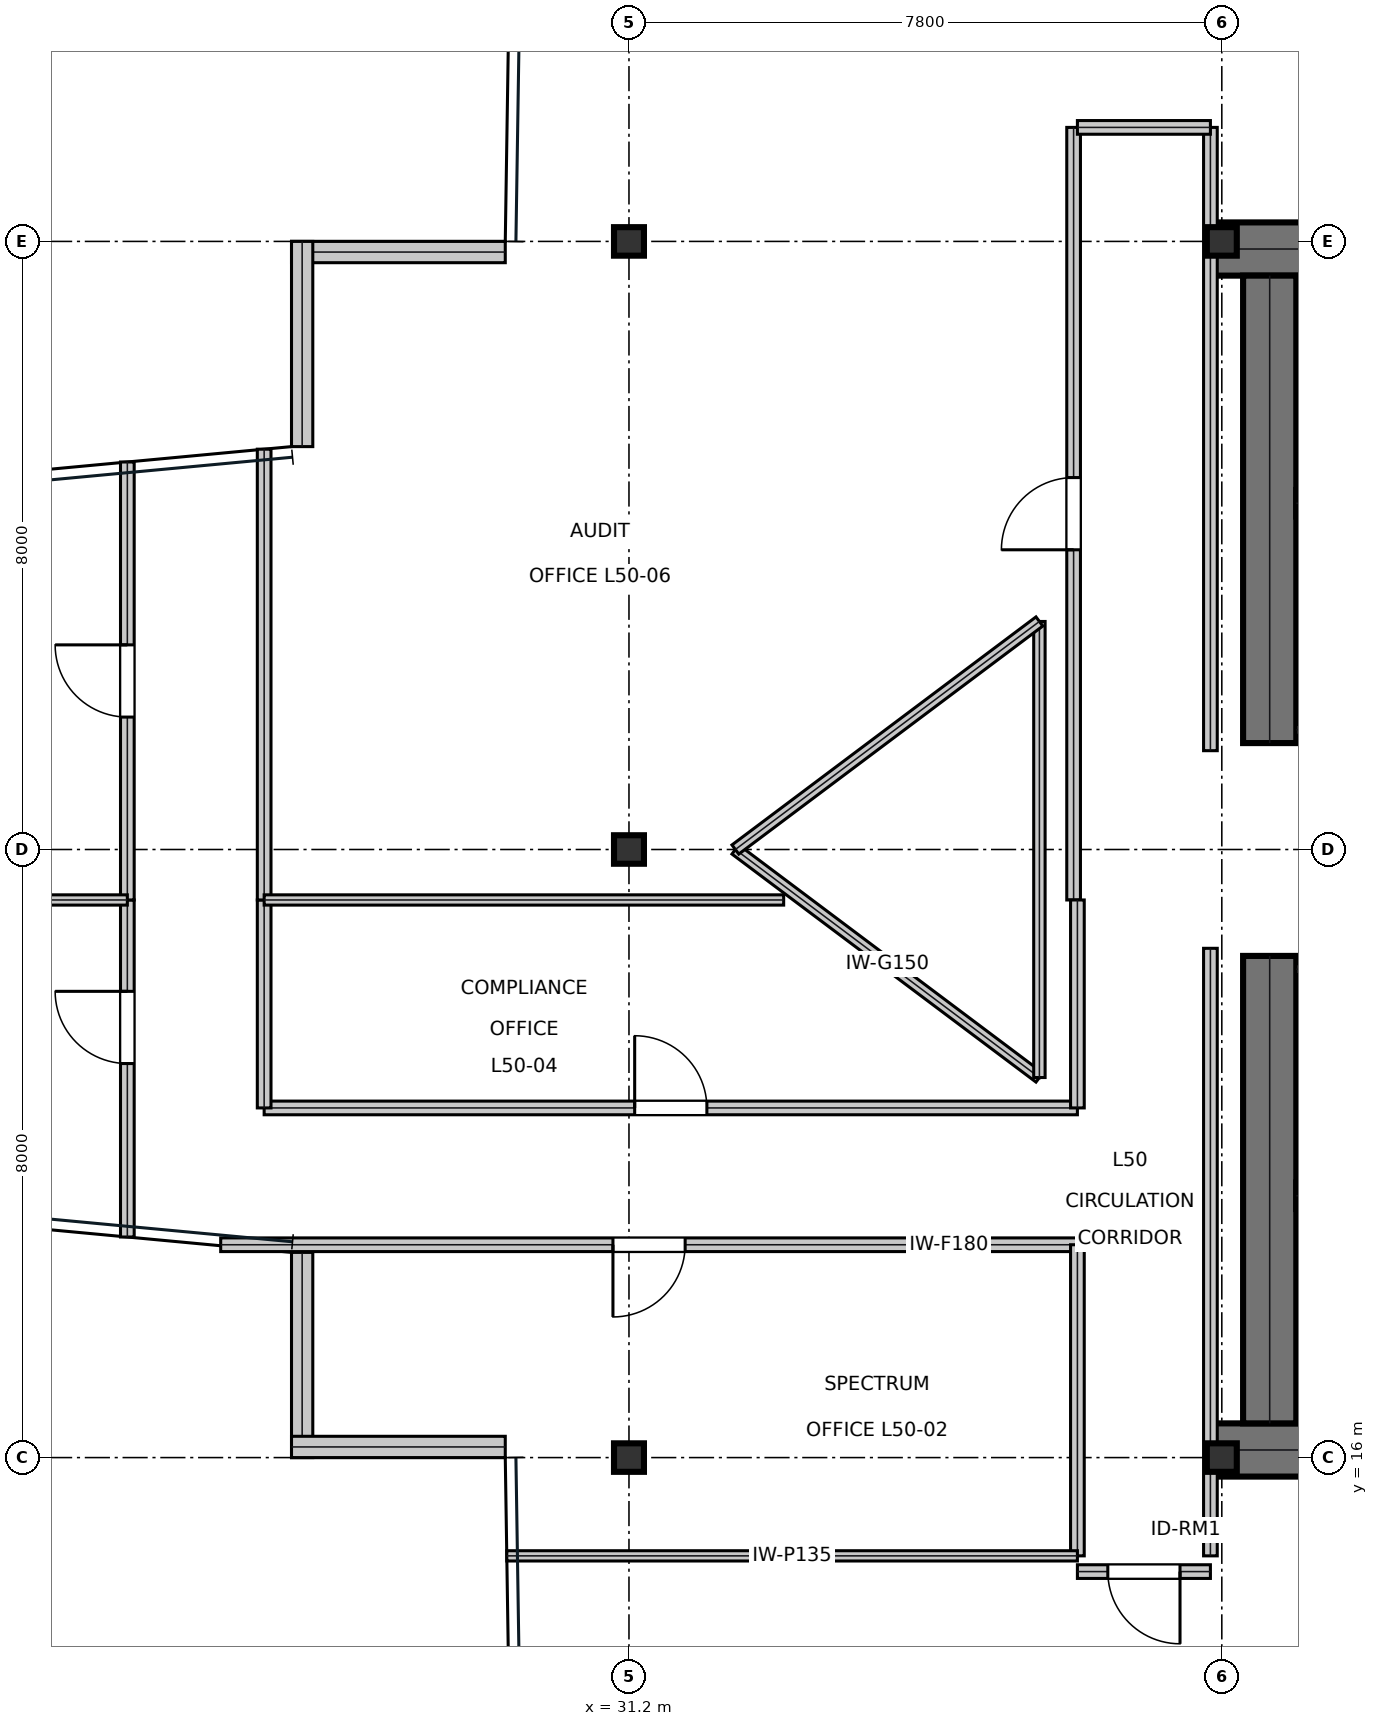
"""IFC4 building model, lengths in metres.
Left out: names, types, materials, properties, quantities, classifications, styles, units other than length and angle.
Written with IfcOpenShell. Run it as: python <this file> out.ifc"""

import sys

from ifc_helpers import new_model, si_unit, direction, frame, frame_2d, origin, origin_2d, place, context, subcontext, project, spatial, rectangle, i_section, extrude, element, fill, save


model = new_model("IFC4")
c1 = context("Model", 3, precision=1e-05, world=origin(), true_north=direction((0.0, 1.0)))
c2 = subcontext(c1, "Body", "Model", "MODEL_VIEW")
j1 = project(units=[si_unit("LENGTHUNIT", "METRE"), si_unit("PLANEANGLEUNIT", "RADIAN")], contexts=[c1])
p1 = place(None, origin())
s1 = spatial("IfcSite", under=j1, at=p1, CompositionType="ELEMENT")
p2 = place(p1, origin())
s2 = spatial("IfcBuilding", under=s1, at=p2, CompositionType="ELEMENT")
p3 = place(p2, frame((0.0, 0.0, 216.15)))
s3 = spatial("IfcBuildingStorey", under=s2, at=p3, CompositionType="ELEMENT", Elevation=216.15)
for number, where, z_axis, x_axis in (
    (1, (38.8, 31.9, 0.0), (0.0, 0.0, 1.0), (1.0, 0.0, 0.0)),
    (2, (38.8, 16.1, 0.0), (0.0, 0.0, 1.0), (1.0, 0.0, 0.0)),
):
    element("IfcWall", number, at=place(p3, frame(where, z_axis=z_axis, x_axis=x_axis)), inside=s3, PredefinedType="SHEAR", context=c2, shape_type="SweptSolid", body=[
        extrude(rectangle(XDim=16.0, YDim=0.7, at=frame_2d((8.0, 0.0))), origin(), (0.0, 0.0, 1.0), 3.79),
    ])
for number, where, z_axis, x_axis in (
    (3, (39.63, 16.45, 0.0), (0.0, 0.0, 1.0), (0.0, 1.0, 0.0)),
    (4, (39.63, 25.4, 0.0), (0.0, 0.0, 1.0), (0.0, 1.0, 0.0)),
):
    element("IfcWall", number, at=place(p3, frame(where, z_axis=z_axis, x_axis=x_axis)), inside=s3, PredefinedType="SHEAR", context=c2, shape_type="SweptSolid", body=[
        extrude(rectangle(XDim=6.15, YDim=0.7, at=frame_2d((3.075, 0.0))), origin(), (0.0, 0.0, 1.0), 3.79),
    ])
p4 = place(p3, frame((39.98, 28.555, 0.0), z_axis=(0.0, 0.0, 1.0), x_axis=(1.0, 0.0, 0.0)))
e5 = element("IfcWall", 5, at=p4, inside=s3, PredefinedType="SHEAR", context=c2, shape_type="SweptSolid", body=[
    extrude(rectangle(XDim=7.71, YDim=0.35, at=frame_2d((3.855, 0.0))), origin(), (0.0, 0.0, 1.0), 3.79),
])
p5 = place(p4, frame((0.25, 0.0, 0.0)))
e6 = element("IfcOpeningElement", 6, at=p5, cuts=e5, PredefinedType="OPENING", context=c2, shape_type="SweptSolid", body=[
    extrude(rectangle(XDim=1.1, YDim=2.15, at=frame_2d((0.55, 1.075))), frame((0.0, 0.185, 0.0), z_axis=(0.0, -1.0, 0.0), x_axis=(1.0, 0.0, 0.0)), (0.0, 0.0, 1.0), 0.37),
])
p6 = place(p3, frame((39.98, 19.445, 0.0), z_axis=(0.0, 0.0, 1.0), x_axis=(1.0, 0.0, 0.0)))
e7 = element("IfcWall", 7, at=p6, inside=s3, PredefinedType="SHEAR", context=c2, shape_type="SweptSolid", body=[
    extrude(rectangle(XDim=7.71, YDim=0.35, at=frame_2d((3.855, 0.0))), origin(), (0.0, 0.0, 1.0), 3.79),
])
p7 = place(p6, frame((0.25, 0.0, 0.0)))
e8 = element("IfcOpeningElement", 8, at=p7, cuts=e7, PredefinedType="OPENING", context=c2, shape_type="SweptSolid", body=[
    extrude(rectangle(XDim=1.1, YDim=2.15, at=frame_2d((0.55, 1.075))), frame((0.0, 0.185, 0.0), z_axis=(0.0, -1.0, 0.0), x_axis=(1.0, 0.0, 0.0)), (0.0, 0.0, 1.0), 0.37),
])
for number, where, z_axis, x_axis in (
    (9, (31.2, 16.0, 0.0), (0.0, 0.0, 1.0), (1.0, 0.0, 0.0)),
    (10, (31.2, 24.0, 0.0), (0.0, 0.0, 1.0), (1.0, 0.0, 0.0)),
    (11, (31.2, 32.0, 0.0), (0.0, 0.0, 1.0), (1.0, 0.0, 0.0)),
    (12, (39.0, 16.0, 0.0), (0.0, 0.0, 1.0), (1.0, 0.0, 0.0)),
    (13, (39.0, 32.0, 0.0), (0.0, 0.0, 1.0), (1.0, 0.0, 0.0)),
):
    element("IfcColumn", number, at=place(p3, frame(where, z_axis=z_axis, x_axis=x_axis)), inside=s3, PredefinedType="COLUMN", context=c2, shape_type="SweptSolid", body=[
        extrude(i_section(OverallWidth=0.394, OverallDepth=0.375, WebThickness=0.017, FlangeThickness=0.028, at=origin_2d()), origin(), (0.0, 0.0, 1.0), 4.044),
    ])
p8 = place(p3, frame((29.573, 31.86, 0.0), z_axis=(0.0, 0.0, 1.0), x_axis=(-1.0, 0.0, 0.0)))
e14 = element("IfcWall", 14, at=p8, inside=s3, PredefinedType="STANDARD", context=c2, shape_type="SweptSolid", body=[
    extrude(rectangle(XDim=2.812, YDim=0.28, at=frame_2d((1.406, 0.0))), origin(), (0.0, 0.0, 1.0), 3.79),
])
for number, where, z_axis, x_axis in (
    (15, (26.9, 32.0, 0.0), (0.0, 0.0, 1.0), (0.0, -1.0, 0.0)),
    (16, (26.9, 18.7, 0.0), (0.0, 0.0, 1.0), (0.0, -1.0, 0.0)),
):
    element("IfcWall", number, at=place(p3, frame(where, z_axis=z_axis, x_axis=x_axis)), inside=s3, PredefinedType="STANDARD", context=c2, shape_type="SweptSolid", body=[
        extrude(rectangle(XDim=2.7, YDim=0.28, at=frame_2d((1.35, 0.0))), origin(), (0.0, 0.0, 1.0), 3.319),
    ])
p9 = place(p3, frame((26.76, 16.14, 0.0), z_axis=(0.0, 0.0, 1.0), x_axis=(1.0, 0.0, 0.0)))
e17 = element("IfcWall", 17, at=p9, inside=s3, PredefinedType="STANDARD", context=c2, shape_type="SweptSolid", body=[
    extrude(rectangle(XDim=2.812, YDim=0.28, at=frame_2d((1.406, 0.0))), origin(), (0.0, 0.0, 1.0), 3.79),
])
p10 = place(p3, frame((39.98, 25.575, 0.0), z_axis=(0.0, 0.0, 1.0), x_axis=(1.0, 0.0, 0.0)))
e18 = element("IfcWall", 18, at=p10, inside=s3, PredefinedType="PARTITIONING", context=c2, shape_type="SweptSolid", body=[
    extrude(rectangle(XDim=5.9, YDim=0.15, at=frame_2d((2.95, 0.0))), origin(), (0.0, 0.0, 1.0), 3.79),
])
p11 = place(p10, frame((2.35, 0.0, 0.0)))
e19 = element("IfcOpeningElement", 19, at=p11, cuts=e18, PredefinedType="OPENING", context=c2, shape_type="SweptSolid", body=[
    extrude(rectangle(XDim=1.05, YDim=2.15, at=frame_2d((0.525, 1.075))), frame((0.0, 0.085, 0.0), z_axis=(0.0, -1.0, 0.0), x_axis=(1.0, 0.0, 0.0)), (0.0, 0.0, 1.0), 0.17),
])
p12 = place(p3, frame((39.98, 22.425, 0.0), z_axis=(0.0, 0.0, 1.0), x_axis=(1.0, 0.0, 0.0)))
e20 = element("IfcWall", 20, at=p12, inside=s3, PredefinedType="PARTITIONING", context=c2, shape_type="SweptSolid", body=[
    extrude(rectangle(XDim=5.9, YDim=0.15, at=frame_2d((2.95, 0.0))), origin(), (0.0, 0.0, 1.0), 3.79),
])
p13 = place(p12, frame((2.35, 0.0, 0.0)))
e21 = element("IfcOpeningElement", 21, at=p13, cuts=e20, PredefinedType="OPENING", context=c2, shape_type="SweptSolid", body=[
    extrude(rectangle(XDim=1.05, YDim=2.15, at=frame_2d((0.525, 1.075))), frame((0.0, 0.085, 0.0), z_axis=(0.0, -1.0, 0.0), x_axis=(1.0, 0.0, 0.0)), (0.0, 0.0, 1.0), 0.17),
])
p14 = place(p3, frame((37.1, 14.5, 0.0), z_axis=(0.0, 0.0, 1.0), x_axis=(1.0, 0.0, 0.0)))
e22 = element("IfcWall", 22, at=p14, inside=s3, PredefinedType="SOLIDWALL", context=c2, shape_type="SweptSolid", body=[
    extrude(rectangle(XDim=1.75, YDim=0.18, at=frame_2d((0.875, 0.0))), origin(), (0.0, 0.0, 1.0), 3.241),
])
p15 = place(p14, frame((0.4, 0.0, 0.0)))
e23 = element("IfcOpeningElement", 23, at=p15, cuts=e22, PredefinedType="OPENING", context=c2, shape_type="SweptSolid", body=[
    extrude(rectangle(XDim=0.95, YDim=2.15, at=frame_2d((0.475, 1.075))), frame((0.0, 0.1, 0.0), z_axis=(0.0, -1.0, 0.0), x_axis=(1.0, 0.0, 0.0)), (0.0, 0.0, 1.0), 0.2),
])
p16 = place(p3, frame((25.828, 18.8, 0.0), z_axis=(0.0, 0.0, 1.0), x_axis=(1.0, 0.0, 0.0)))
e24 = element("IfcWall", 24, at=p16, inside=s3, PredefinedType="SOLIDWALL", context=c2, shape_type="SweptSolid", body=[
    extrude(rectangle(XDim=11.272, YDim=0.18, at=frame_2d((5.636, 0.0))), origin(), (0.0, 0.0, 1.0), 3.241),
])
p17 = place(p16, frame((5.161, 0.0, 0.0)))
e25 = element("IfcOpeningElement", 25, at=p17, cuts=e24, PredefinedType="OPENING", context=c2, shape_type="SweptSolid", body=[
    extrude(rectangle(XDim=0.95, YDim=2.15, at=frame_2d((0.475, 1.075))), frame((0.0, 0.1, 0.0), z_axis=(0.0, -1.0, 0.0), x_axis=(1.0, 0.0, 0.0)), (0.0, 0.0, 1.0), 0.2),
])
p18 = place(p3, frame((24.6, 18.902, 0.0), z_axis=(0.0, 0.0, 1.0), x_axis=(0.0, 1.0, 0.0)))
e26 = element("IfcWall", 26, at=p18, inside=s3, PredefinedType="SOLIDWALL", context=c2, shape_type="SweptSolid", body=[
    extrude(rectangle(XDim=4.434, YDim=0.18, at=frame_2d((2.217, 0.0))), origin(), (0.0, 0.0, 1.0), 3.241),
])
p19 = place(p18, frame((2.282, 0.0, 0.0)))
e27 = element("IfcOpeningElement", 27, at=p19, cuts=e26, PredefinedType="OPENING", context=c2, shape_type="SweptSolid", body=[
    extrude(rectangle(XDim=0.95, YDim=2.15, at=frame_2d((0.475, 1.075))), frame((0.0, 0.1, 0.0), z_axis=(0.0, -1.0, 0.0), x_axis=(1.0, 0.0, 0.0)), (0.0, 0.0, 1.0), 0.2),
])
p20 = place(p3, frame((26.4, 20.6, 0.0), z_axis=(0.0, 0.0, 1.0), x_axis=(1.0, 0.0, 0.0)))
e28 = element("IfcWall", 28, at=p20, inside=s3, PredefinedType="SOLIDWALL", context=c2, shape_type="SweptSolid", body=[
    extrude(rectangle(XDim=10.7, YDim=0.18, at=frame_2d((5.35, 0.0))), origin(), (0.0, 0.0, 1.0), 3.241),
])
p21 = place(p20, frame((4.875, 0.0, 0.0)))
e29 = element("IfcOpeningElement", 29, at=p21, cuts=e28, PredefinedType="OPENING", context=c2, shape_type="SweptSolid", body=[
    extrude(rectangle(XDim=0.95, YDim=2.15, at=frame_2d((0.475, 1.075))), frame((0.0, 0.1, 0.0), z_axis=(0.0, -1.0, 0.0), x_axis=(1.0, 0.0, 0.0)), (0.0, 0.0, 1.0), 0.2),
])
p22 = place(p3, frame((24.6, 23.336, 0.0), z_axis=(0.0, 0.0, 1.0), x_axis=(0.0, 1.0, 0.0)))
e30 = element("IfcWall", 30, at=p22, inside=s3, PredefinedType="SOLIDWALL", context=c2, shape_type="SweptSolid", body=[
    extrude(rectangle(XDim=5.762, YDim=0.18, at=frame_2d((2.881, 0.0))), origin(), (0.0, 0.0, 1.0), 3.241),
])
p23 = place(p22, frame((2.406, 0.0, 0.0)))
e31 = element("IfcOpeningElement", 31, at=p23, cuts=e30, PredefinedType="OPENING", context=c2, shape_type="SweptSolid", body=[
    extrude(rectangle(XDim=0.95, YDim=2.15, at=frame_2d((0.475, 1.075))), frame((0.0, 0.1, 0.0), z_axis=(0.0, -1.0, 0.0), x_axis=(1.0, 0.0, 0.0)), (0.0, 0.0, 1.0), 0.2),
])
p24 = place(p3, frame((37.05, 23.336, 0.0), z_axis=(0.0, 0.0, 1.0), x_axis=(0.0, 1.0, 0.0)))
e32 = element("IfcWall", 32, at=p24, inside=s3, PredefinedType="SOLIDWALL", context=c2, shape_type="SweptSolid", body=[
    extrude(rectangle(XDim=10.164, YDim=0.18, at=frame_2d((5.082, 0.0))), origin(), (0.0, 0.0, 1.0), 3.241),
])
p25 = place(p24, frame((4.607, 0.0, 0.0)))
e33 = element("IfcOpeningElement", 33, at=p25, cuts=e32, PredefinedType="OPENING", context=c2, shape_type="SweptSolid", body=[
    extrude(rectangle(XDim=0.95, YDim=2.15, at=frame_2d((0.475, 1.075))), frame((0.0, 0.1, 0.0), z_axis=(0.0, -1.0, 0.0), x_axis=(1.0, 0.0, 0.0)), (0.0, 0.0, 1.0), 0.2),
])
p26 = place(p3, frame((38.85, 14.707, 0.0), z_axis=(0.0, 0.0, 1.0), x_axis=(0.0, 1.0, 0.0)))
e34 = element("IfcWall", 34, at=p26, inside=s3, PredefinedType="SOLIDWALL", context=c2, shape_type="SweptSolid", body=[
    extrude(rectangle(XDim=7.993, YDim=0.18, at=frame_2d((3.997, 0.0))), origin(), (0.0, 0.0, 1.0), 3.241),
])
p27 = place(p3, frame((37.1, 14.707, 0.0), z_axis=(0.0, 0.0, 1.0), x_axis=(0.0, 1.0, 0.0)))
e35 = element("IfcWall", 35, at=p27, inside=s3, PredefinedType="SOLIDWALL", context=c2, shape_type="SweptSolid", body=[
    extrude(rectangle(XDim=4.093, YDim=0.18, at=frame_2d((2.046, 0.0))), origin(), (0.0, 0.0, 1.0), 3.241),
])
p28 = place(p3, frame((26.4, 20.6, 0.0), z_axis=(0.0, 0.0, 1.0), x_axis=(0.0, 1.0, 0.0)))
e36 = element("IfcWall", 36, at=p28, inside=s3, PredefinedType="SOLIDWALL", context=c2, shape_type="SweptSolid", body=[
    extrude(rectangle(XDim=2.736, YDim=0.18, at=frame_2d((1.368, 0.0))), origin(), (0.0, 0.0, 1.0), 3.241),
])
p29 = place(p3, frame((37.1, 20.6, 0.0), z_axis=(0.0, 0.0, 1.0), x_axis=(0.0, 1.0, 0.0)))
e37 = element("IfcWall", 37, at=p29, inside=s3, PredefinedType="SOLIDWALL", context=c2, shape_type="SweptSolid", body=[
    extrude(rectangle(XDim=2.736, YDim=0.18, at=frame_2d((1.368, 0.0))), origin(), (0.0, 0.0, 1.0), 3.79),
])
p30 = place(p3, frame((38.85, 25.3, 0.0), z_axis=(0.0, 0.0, 1.0), x_axis=(0.0, 1.0, 0.0)))
e38 = element("IfcWall", 38, at=p30, inside=s3, PredefinedType="SOLIDWALL", context=c2, shape_type="SweptSolid", body=[
    extrude(rectangle(XDim=8.2, YDim=0.18, at=frame_2d((4.1, 0.0))), origin(), (0.0, 0.0, 1.0), 3.241),
])
p31 = place(p3, frame((26.4, 23.336, 0.0), z_axis=(0.0, 0.0, 1.0), x_axis=(0.0, 1.0, 0.0)))
e39 = element("IfcWall", 39, at=p31, inside=s3, PredefinedType="SOLIDWALL", context=c2, shape_type="SweptSolid", body=[
    extrude(rectangle(XDim=5.931, YDim=0.18, at=frame_2d((2.965, 0.0))), origin(), (0.0, 0.0, 1.0), 3.241),
])
p32 = place(p3, frame((37.1, 33.5, 0.0), z_axis=(0.0, 0.0, 1.0), x_axis=(1.0, 0.0, 0.0)))
e40 = element("IfcWall", 40, at=p32, inside=s3, PredefinedType="SOLIDWALL", context=c2, shape_type="SweptSolid", body=[
    extrude(rectangle(XDim=1.75, YDim=0.18, at=frame_2d((0.875, 0.0))), origin(), (0.0, 0.0, 1.0), 3.241),
])
p33 = place(p3, frame((29.592, 14.707, 0.0), z_axis=(0.0, 0.0, 1.0), x_axis=(1.0, 0.0, 0.0)))
e41 = element("IfcWall", 41, at=p33, inside=s3, PredefinedType="PARTITIONING", context=c2, shape_type="SweptSolid", body=[
    extrude(rectangle(XDim=7.508, YDim=0.135, at=frame_2d((3.754, 0.0))), origin(), (0.0, 0.0, 1.0), 3.319),
])
p34 = place(p3, frame((13.54, 23.336, 0.0), z_axis=(0.0, 0.0, 1.0), x_axis=(1.0, 0.0, 0.0)))
e42 = element("IfcWall", 42, at=p34, inside=s3, PredefinedType="PARTITIONING", context=c2, shape_type="SweptSolid", body=[
    extrude(rectangle(XDim=11.06, YDim=0.135, at=frame_2d((5.53, 0.0))), origin(), (0.0, 0.0, 1.0), 3.319),
])
p35 = place(p3, frame((26.4, 23.336, 0.0), z_axis=(0.0, 0.0, 1.0), x_axis=(1.0, 0.0, 0.0)))
e43 = element("IfcWall", 43, at=p35, inside=s3, PredefinedType="PARTITIONING", context=c2, shape_type="SweptSolid", body=[
    extrude(rectangle(XDim=6.835, YDim=0.135, at=frame_2d((3.418, 0.0))), origin(), (0.0, 0.0, 1.0), 3.241),
])
p36 = place(p3, frame((32.6, 24.0, 0.0), z_axis=(0.0, 0.0, 1.0), x_axis=(0.8, -0.6, 0.0)))
e44 = element("IfcWall", 44, at=p36, inside=s3, PredefinedType="MOVABLE", context=c2, shape_type="SweptSolid", body=[
    extrude(rectangle(XDim=5.0, YDim=0.15, at=frame_2d((2.5, 0.0))), origin(), (0.0, 0.0, 1.0), 3.79),
])
p37 = place(p3, frame((36.6, 21.0, 0.0), z_axis=(0.0, 0.0, 1.0), x_axis=(0.0, 1.0, 0.0)))
e45 = element("IfcWall", 45, at=p37, inside=s3, PredefinedType="MOVABLE", context=c2, shape_type="SweptSolid", body=[
    extrude(rectangle(XDim=6.0, YDim=0.15, at=frame_2d((3.0, 0.0))), origin(), (0.0, 0.0, 1.0), 3.79),
])
p38 = place(p3, frame((36.6, 27.0, 0.0), z_axis=(0.0, 0.0, 1.0), x_axis=(-0.8, -0.6, 0.0)))
e46 = element("IfcWall", 46, at=p38, inside=s3, PredefinedType="MOVABLE", context=c2, shape_type="SweptSolid", body=[
    extrude(rectangle(XDim=5.0, YDim=0.15, at=frame_2d((2.5, 0.0))), origin(), (0.0, 0.0, 1.0), 3.79),
])
p39 = place(p15, frame((0.95, 0.0, 0.0), z_axis=(0.0, 0.0, 1.0), x_axis=(-1.0, 0.0, 0.0)))
e47 = element("IfcDoor", 47, at=p39, inside=s3, OperationType="SINGLE_SWING_LEFT", PredefinedType="DOOR", context=c2, shape_type="SweptSolid", body=[
    extrude(rectangle(XDim=0.95, YDim=2.15, at=frame_2d((0.475, 1.075))), frame((0.0, 0.025, 0.0), z_axis=(0.0, -1.0, 0.0), x_axis=(1.0, 0.0, 0.0)), (0.0, 0.0, 1.0), 0.05),
])
fill(e23, e47)
p40 = place(p17, frame((0.95, 0.0, 0.0), z_axis=(0.0, 0.0, 1.0), x_axis=(-1.0, 0.0, 0.0)))
e48 = element("IfcDoor", 48, at=p40, inside=s3, OperationType="SINGLE_SWING_RIGHT", PredefinedType="DOOR", context=c2, shape_type="SweptSolid", body=[
    extrude(rectangle(XDim=0.95, YDim=2.15, at=frame_2d((0.475, 1.075))), frame((0.0, 0.025, 0.0), z_axis=(0.0, -1.0, 0.0), x_axis=(1.0, 0.0, 0.0)), (0.0, 0.0, 1.0), 0.05),
])
fill(e25, e48)
p41 = place(p19, origin())
e49 = element("IfcDoor", 49, at=p41, inside=s3, OperationType="SINGLE_SWING_RIGHT", PredefinedType="DOOR", context=c2, shape_type="SweptSolid", body=[
    extrude(rectangle(XDim=0.95, YDim=2.15, at=frame_2d((0.475, 1.075))), frame((0.0, 0.025, 0.0), z_axis=(0.0, -1.0, 0.0), x_axis=(1.0, 0.0, 0.0)), (0.0, 0.0, 1.0), 0.05),
])
fill(e27, e49)
p42 = place(p21, origin())
e50 = element("IfcDoor", 50, at=p42, inside=s3, OperationType="SINGLE_SWING_LEFT", PredefinedType="DOOR", context=c2, shape_type="SweptSolid", body=[
    extrude(rectangle(XDim=0.95, YDim=2.15, at=frame_2d((0.475, 1.075))), frame((0.0, 0.025, 0.0), z_axis=(0.0, -1.0, 0.0), x_axis=(1.0, 0.0, 0.0)), (0.0, 0.0, 1.0), 0.05),
])
fill(e29, e50)
p43 = place(p23, origin())
e51 = element("IfcDoor", 51, at=p43, inside=s3, OperationType="SINGLE_SWING_RIGHT", PredefinedType="DOOR", context=c2, shape_type="SweptSolid", body=[
    extrude(rectangle(XDim=0.95, YDim=2.15, at=frame_2d((0.475, 1.075))), frame((0.0, 0.025, 0.0), z_axis=(0.0, -1.0, 0.0), x_axis=(1.0, 0.0, 0.0)), (0.0, 0.0, 1.0), 0.05),
])
fill(e31, e51)
p44 = place(p25, origin())
e52 = element("IfcDoor", 52, at=p44, inside=s3, OperationType="SINGLE_SWING_LEFT", PredefinedType="DOOR", context=c2, shape_type="SweptSolid", body=[
    extrude(rectangle(XDim=0.95, YDim=2.15, at=frame_2d((0.475, 1.075))), frame((0.0, 0.025, 0.0), z_axis=(0.0, -1.0, 0.0), x_axis=(1.0, 0.0, 0.0)), (0.0, 0.0, 1.0), 0.05),
])
fill(e33, e52)
save(model, sys.argv[1])
